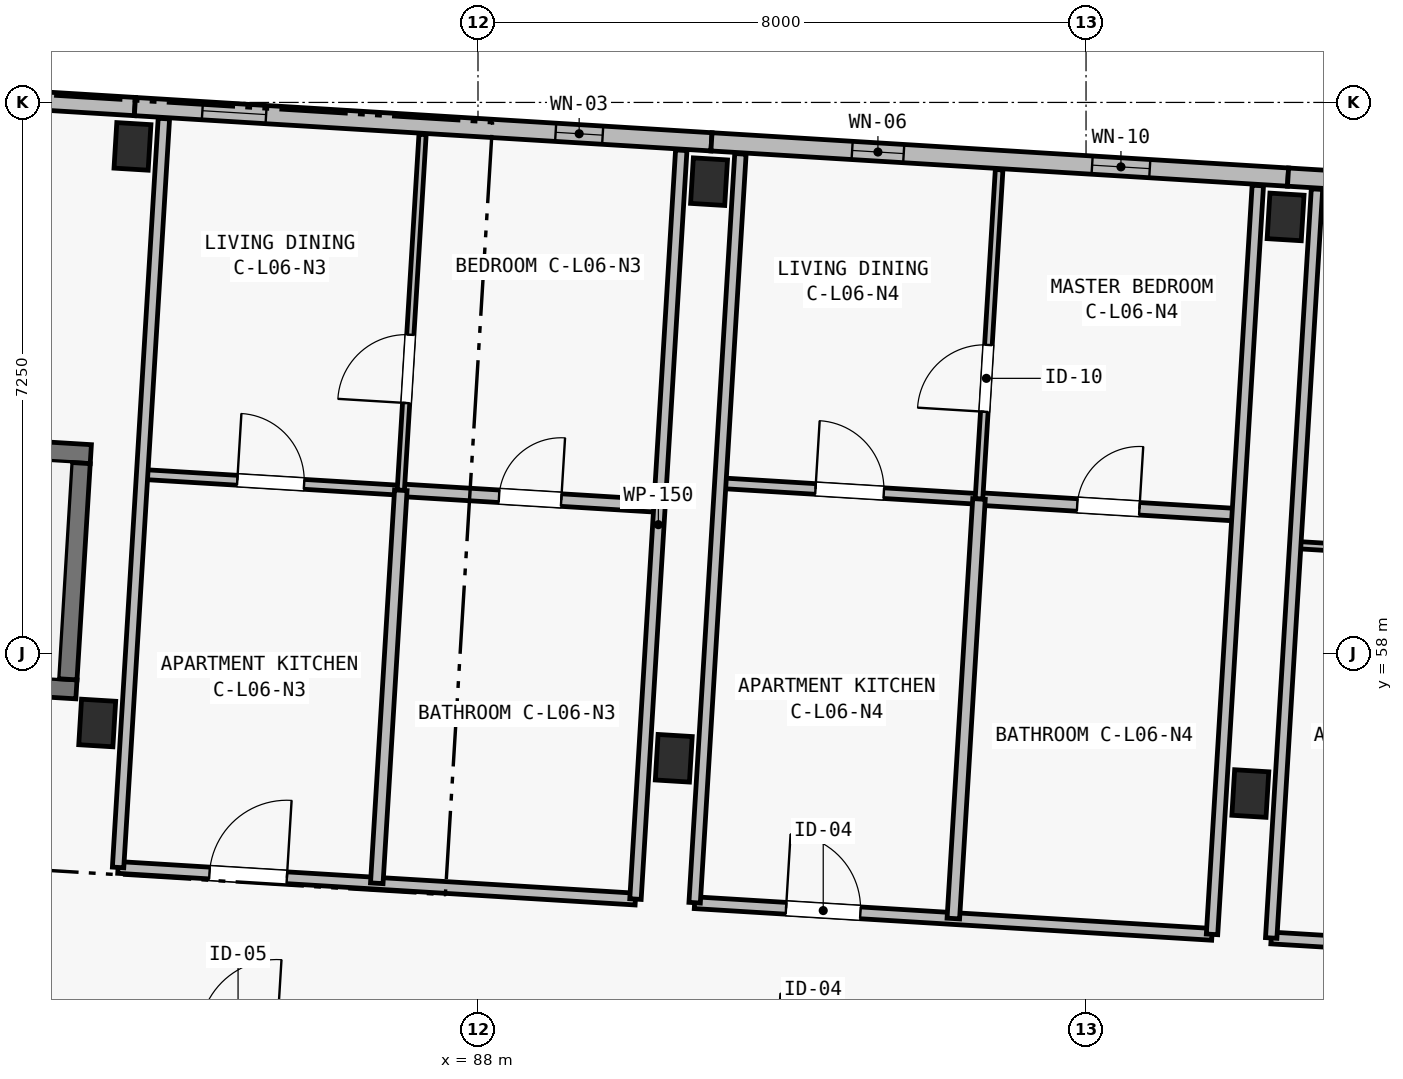
"""IFC4 building model, lengths in metres.
Left out: names, types, materials, properties, quantities, classifications, styles, units other than length and angle.
Written with IfcOpenShell. Run it as: python <this file> out.ifc"""

import sys

from ifc_helpers import new_model, si_unit, direction, frame, frame_2d, origin, origin_2d, place, context, subcontext, project, spatial, rectangle, extrude, element, fill, save


model = new_model("IFC4")
c1 = context("Model", 3, precision=1e-05, world=origin(), true_north=direction((0.0, 1.0)))
c2 = subcontext(c1, "Body", "Model", "MODEL_VIEW")
j1 = project(units=[si_unit("LENGTHUNIT", "METRE"), si_unit("PLANEANGLEUNIT", "RADIAN")], contexts=[c1])
p1 = place(None, origin())
s1 = spatial("IfcSite", under=j1, at=p1, CompositionType="ELEMENT")
p2 = place(p1, origin())
s2 = spatial("IfcBuilding", under=s1, at=p2, CompositionType="ELEMENT")
p3 = place(p2, frame((0.0, 0.0, 21.4)))
s3 = spatial("IfcBuildingStorey", under=s2, at=p3, CompositionType="ELEMENT", Elevation=21.4)
for number, where, z_axis, x_axis in (
    (1, (82.99, 57.086, 0.0), (0.0, 0.0, 1.0), (0.998, -0.061, 0.0)),
    (2, (83.454, 64.672, 0.0), (0.0, 0.0, 1.0), (0.998, -0.061, 0.0)),
    (3, (90.576, 56.622, 0.0), (0.0, 0.0, 1.0), (0.998, -0.061, 0.0)),
    (4, (91.04, 64.208, 0.0), (0.0, 0.0, 1.0), (0.998, -0.061, 0.0)),
    (5, (98.162, 56.158, 0.0), (0.0, 0.0, 1.0), (0.998, -0.061, 0.0)),
    (6, (98.626, 63.744, 0.0), (0.0, 0.0, 1.0), (0.998, -0.061, 0.0)),
):
    element("IfcColumn", number, at=place(p3, frame(where, z_axis=z_axis, x_axis=x_axis)), inside=s3, PredefinedType="COLUMN", context=c2, shape_type="SweptSolid", body=[
        extrude(rectangle(XDim=0.45, YDim=0.6, at=origin_2d()), origin(), (0.0, 0.0, 1.0), 3.25),
    ])
p4 = place(p3, frame((75.919, 61.05, 0.0), z_axis=(0.0, 0.0, 1.0), x_axis=(0.998135546153, -0.061036313012, 0.0)))
e7 = element("IfcWall", 7, at=p4, inside=s3, PredefinedType="SHEAR", context=c2, shape_type="SweptSolid", body=[
    extrude(rectangle(XDim=7.0, YDim=0.25, at=frame_2d((3.5, 0.0))), origin(), (0.0, 0.0, 1.0), 3.25),
])
p5 = place(p4, frame((0.45, 0.0, 0.0)))
e8 = element("IfcOpeningElement", 8, at=p5, cuts=e7, PredefinedType="OPENING", context=c2, shape_type="SweptSolid", body=[
    extrude(rectangle(XDim=0.9, YDim=2.1, at=frame_2d((0.45, 1.05))), frame((0.0, 0.14, 0.0), z_axis=(0.0, -1.0, 0.0), x_axis=(1.0, 0.0, 0.0)), (0.0, 0.0, 1.0), 0.28),
])
p6 = place(p3, frame((75.73, 57.956, 0.0), z_axis=(0.0, 0.0, 1.0), x_axis=(0.998135546153, -0.061036313012, 0.0)))
e9 = element("IfcWall", 9, at=p6, inside=s3, PredefinedType="SHEAR", context=c2, shape_type="SweptSolid", body=[
    extrude(rectangle(XDim=7.0, YDim=0.25, at=frame_2d((3.5, 0.0))), origin(), (0.0, 0.0, 1.0), 3.25),
])
p7 = place(p6, frame((0.45, 0.0, 0.0)))
e10 = element("IfcOpeningElement", 10, at=p7, cuts=e9, PredefinedType="OPENING", context=c2, shape_type="SweptSolid", body=[
    extrude(rectangle(XDim=1.05, YDim=2.15, at=frame_2d((0.525, 1.075))), frame((0.0, 0.14, 0.0), z_axis=(0.0, -1.0, 0.0), x_axis=(1.0, 0.0, 0.0)), (0.0, 0.0, 1.0), 0.28),
])
p8 = place(p3, frame((82.599, 57.661, 0.0), z_axis=(0.0, 0.0, 1.0), x_axis=(0.06107697143, 0.998133059046, 0.0)))
e11 = element("IfcWall", 11, at=p8, inside=s3, PredefinedType="SHEAR", context=c2, shape_type="SweptSolid", body=[
    extrude(rectangle(XDim=2.85, YDim=0.25, at=frame_2d((1.425, 0.0))), origin(), (0.0, 0.0, 1.0), 3.25),
])
p9 = place(p3, frame((81.115, 65.341, 0.0), z_axis=(0.0, 0.0, 1.0), x_axis=(0.998134103342, -0.061059902923, 0.0)))
e12 = element("IfcWall", 12, at=p9, inside=s3, PredefinedType="SOLIDWALL", context=c2, shape_type="SweptSolid", body=[
    extrude(rectangle(XDim=2.375, YDim=0.24, at=frame_2d((1.188, 0.0))), origin(), (0.0, 0.0, 1.0), 3.0),
])
p10 = place(p3, frame((83.486, 65.196, 0.0), z_axis=(0.0, 0.0, 1.0), x_axis=(0.998135669243, -0.061034300063, 0.0)))
e13 = element("IfcWall", 13, at=p10, inside=s3, PredefinedType="SOLIDWALL", context=c2, shape_type="SweptSolid", body=[
    extrude(rectangle(XDim=7.6, YDim=0.24, at=frame_2d((3.8, 0.0))), origin(), (0.0, 0.0, 1.0), 3.0),
])
p11 = place(p10, frame((0.89, 0.0, 0.5)))
e14 = element("IfcOpeningElement", 14, at=p11, cuts=e13, PredefinedType="OPENING", context=c2, shape_type="SweptSolid", body=[
    extrude(rectangle(XDim=0.84, YDim=2.28, at=frame_2d((0.42, 1.14))), frame((0.0, 0.135, 0.0), z_axis=(0.0, -1.0, 0.0), x_axis=(1.0, 0.0, 0.0)), (0.0, 0.0, 1.0), 0.27),
])
p12 = place(p10, frame((5.546, 0.0, 0.44)))
e15 = element("IfcOpeningElement", 15, at=p12, cuts=e13, PredefinedType="OPENING", context=c2, shape_type="SweptSolid", body=[
    extrude(rectangle(XDim=0.62, YDim=2.28, at=frame_2d((0.31, 1.14))), frame((0.0, 0.135, 0.0), z_axis=(0.0, -1.0, 0.0), x_axis=(1.0, 0.0, 0.0)), (0.0, 0.0, 1.0), 0.27),
])
p13 = place(p3, frame((91.072, 64.732, 0.0), z_axis=(0.0, 0.0, 1.0), x_axis=(0.998133591969, -0.061068261669, 0.0)))
e16 = element("IfcWall", 16, at=p13, inside=s3, PredefinedType="SOLIDWALL", context=c2, shape_type="SweptSolid", body=[
    extrude(rectangle(XDim=7.6, YDim=0.24, at=frame_2d((3.8, 0.0))), origin(), (0.0, 0.0, 1.0), 3.0),
])
p14 = place(p13, frame((1.854, 0.0, 0.44)))
e17 = element("IfcOpeningElement", 17, at=p14, cuts=e16, PredefinedType="OPENING", context=c2, shape_type="SweptSolid", body=[
    extrude(rectangle(XDim=0.68, YDim=2.24, at=frame_2d((0.34, 1.12))), frame((0.0, 0.135, 0.0), z_axis=(0.0, -1.0, 0.0), x_axis=(1.0, 0.0, 0.0)), (0.0, 0.0, 1.0), 0.27),
])
p15 = place(p13, frame((5.018, 0.0, 0.5)))
e18 = element("IfcOpeningElement", 18, at=p15, cuts=e16, PredefinedType="OPENING", context=c2, shape_type="SweptSolid", body=[
    extrude(rectangle(XDim=0.76, YDim=2.34, at=frame_2d((0.38, 1.17))), frame((0.0, 0.135, 0.0), z_axis=(0.0, -1.0, 0.0), x_axis=(1.0, 0.0, 0.0)), (0.0, 0.0, 1.0), 0.27),
])
p16 = place(p3, frame((98.658, 64.268, 0.0), z_axis=(0.0, 0.0, 1.0), x_axis=(0.998134248939, -0.061057522844, 0.0)))
e19 = element("IfcWall", 19, at=p16, inside=s3, PredefinedType="SOLIDWALL", context=c2, shape_type="SweptSolid", body=[
    extrude(rectangle(XDim=8.125, YDim=0.24, at=frame_2d((4.062, 0.0))), origin(), (0.0, 0.0, 1.0), 3.0),
])
p17 = place(p16, frame((1.334, 0.0, 0.5)))
e20 = element("IfcOpeningElement", 20, at=p17, cuts=e19, PredefinedType="OPENING", context=c2, shape_type="SweptSolid", body=[
    extrude(rectangle(XDim=0.82, YDim=2.18, at=frame_2d((0.41, 1.09))), frame((0.0, 0.135, 0.0), z_axis=(0.0, -1.0, 0.0), x_axis=(1.0, 0.0, 0.0)), (0.0, 0.0, 1.0), 0.27),
])
p18 = place(p16, frame((6.029, 0.0, 0.44)))
e21 = element("IfcOpeningElement", 21, at=p18, cuts=e19, PredefinedType="OPENING", context=c2, shape_type="SweptSolid", body=[
    extrude(rectangle(XDim=0.6, YDim=2.22, at=frame_2d((0.3, 1.11))), frame((0.0, 0.135, 0.0), z_axis=(0.0, -1.0, 0.0), x_axis=(1.0, 0.0, 0.0)), (0.0, 0.0, 1.0), 0.27),
])
p19 = place(p3, frame((78.415, 53.378, 0.0), z_axis=(0.0, 0.0, 1.0), x_axis=(0.998132736029, -0.061082250024, 0.0)))
e22 = element("IfcWall", 22, at=p19, inside=s3, PredefinedType="PARTITIONING", context=c2, shape_type="SweptSolid", body=[
    extrude(rectangle(XDim=4.105, YDim=0.155, at=frame_2d((2.052, 0.0))), origin(), (0.0, 0.0, 1.0), 2.97),
])
p20 = place(p19, frame((0.457, 0.0, 0.0)))
e23 = element("IfcOpeningElement", 23, at=p20, cuts=e22, PredefinedType="OPENING", context=c2, shape_type="SweptSolid", body=[
    extrude(rectangle(XDim=0.98, YDim=2.15, at=frame_2d((0.49, 1.075))), frame((0.0, 0.093, 0.0), z_axis=(0.0, -1.0, 0.0), x_axis=(1.0, 0.0, 0.0)), (0.0, 0.0, 1.0), 0.185),
])
p21 = place(p3, frame((83.265, 55.185, 0.0), z_axis=(0.0, 0.0, 1.0), x_axis=(0.998135531673, -0.061036549799, 0.0)))
e24 = element("IfcWall", 24, at=p21, inside=s3, PredefinedType="PARTITIONING", context=c2, shape_type="SweptSolid", body=[
    extrude(rectangle(XDim=6.82, YDim=0.155, at=frame_2d((3.41, 0.0))), origin(), (0.0, 0.0, 1.0), 2.97),
])
p22 = place(p21, frame((1.205, 0.0, 0.0)))
e25 = element("IfcOpeningElement", 25, at=p22, cuts=e24, PredefinedType="OPENING", context=c2, shape_type="SweptSolid", body=[
    extrude(rectangle(XDim=1.02, YDim=2.2, at=frame_2d((0.51, 1.1))), frame((0.0, 0.093, 0.0), z_axis=(0.0, -1.0, 0.0), x_axis=(1.0, 0.0, 0.0)), (0.0, 0.0, 1.0), 0.185),
])
p23 = place(p3, frame((83.581, 60.356, 0.0), z_axis=(0.0, 0.0, 1.0), x_axis=(0.998133350094, -0.061072214879, 0.0)))
e26 = element("IfcWall", 26, at=p23, inside=s3, PredefinedType="PARTITIONING", context=c2, shape_type="SweptSolid", body=[
    extrude(rectangle(XDim=3.41, YDim=0.13, at=frame_2d((1.705, 0.0))), origin(), (0.0, 0.0, 1.0), 2.97),
])
p24 = place(p23, frame((1.255, 0.0, 0.0)))
e27 = element("IfcOpeningElement", 27, at=p24, cuts=e26, PredefinedType="OPENING", context=c2, shape_type="SweptSolid", body=[
    extrude(rectangle(XDim=0.88, YDim=2.1, at=frame_2d((0.44, 1.05))), frame((0.0, 0.08, 0.0), z_axis=(0.0, -1.0, 0.0), x_axis=(1.0, 0.0, 0.0)), (0.0, 0.0, 1.0), 0.16),
])
p25 = place(p3, frame((86.984, 60.147, 0.0), z_axis=(0.0, 0.0, 1.0), x_axis=(0.99813797838, -0.060996525433, 0.0)))
e28 = element("IfcWall", 28, at=p25, inside=s3, PredefinedType="PLUMBINGWALL", context=c2, shape_type="SweptSolid", body=[
    extrude(rectangle(XDim=3.41, YDim=0.165, at=frame_2d((1.705, 0.0))), origin(), (0.0, 0.0, 1.0), 2.97),
])
p26 = place(p25, frame((1.295, 0.0, 0.0)))
e29 = element("IfcOpeningElement", 29, at=p26, cuts=e28, PredefinedType="OPENING", context=c2, shape_type="SweptSolid", body=[
    extrude(rectangle(XDim=0.82, YDim=2.08, at=frame_2d((0.41, 1.04))), frame((0.0, 0.097, 0.0), z_axis=(0.0, -1.0, 0.0), x_axis=(1.0, 0.0, 0.0)), (0.0, 0.0, 1.0), 0.195),
])
p27 = place(p3, frame((86.984, 60.147, 0.0), z_axis=(0.0, 0.0, 1.0), x_axis=(0.061059262019, 0.998134142549, 0.0)))
e30 = element("IfcWall", 30, at=p27, inside=s3, PredefinedType="PARTITIONING", context=c2, shape_type="SweptSolid", body=[
    extrude(rectangle(XDim=4.69, YDim=0.095, at=frame_2d((2.345, 0.0))), origin(), (0.0, 0.0, 1.0), 2.97),
])
p28 = place(p27, frame((1.15, 0.0, 0.0)))
e31 = element("IfcOpeningElement", 31, at=p28, cuts=e30, PredefinedType="OPENING", context=c2, shape_type="SweptSolid", body=[
    extrude(rectangle(XDim=0.9, YDim=2.1, at=frame_2d((0.45, 1.05))), frame((0.0, 0.062, 0.0), z_axis=(0.0, -1.0, 0.0), x_axis=(1.0, 0.0, 0.0)), (0.0, 0.0, 1.0), 0.125),
])
p29 = place(p3, frame((86.668, 54.977, 0.0), z_axis=(0.0, 0.0, 1.0), x_axis=(0.061037231879, 0.998135489963, 0.0)))
e32 = element("IfcWall", 32, at=p29, inside=s3, PredefinedType="PLUMBINGWALL", context=c2, shape_type="SweptSolid", body=[
    extrude(rectangle(XDim=5.18, YDim=0.165, at=frame_2d((2.59, 0.0))), origin(), (0.0, 0.0, 1.0), 2.97),
])
p30 = place(p3, frame((83.265, 55.185, 0.0), z_axis=(0.0, 0.0, 1.0), x_axis=(0.061046193261, 0.998134941923, 0.0)))
e33 = element("IfcWall", 33, at=p30, inside=s3, PredefinedType="PARTITIONING", context=c2, shape_type="SweptSolid", body=[
    extrude(rectangle(XDim=9.87, YDim=0.15, at=frame_2d((4.935, 0.0))), origin(), (0.0, 0.0, 1.0), 2.97),
])
p31 = place(p3, frame((90.072, 54.769, 0.0), z_axis=(0.0, 0.0, 1.0), x_axis=(0.061047700465, 0.998134849741, 0.0)))
e34 = element("IfcWall", 34, at=p31, inside=s3, PredefinedType="PARTITIONING", context=c2, shape_type="SweptSolid", body=[
    extrude(rectangle(XDim=9.87, YDim=0.15, at=frame_2d((4.935, 0.0))), origin(), (0.0, 0.0, 1.0), 2.97),
])
p32 = place(p3, frame((90.85, 54.721, 0.0), z_axis=(0.0, 0.0, 1.0), x_axis=(0.998135665032, -0.06103436893, 0.0)))
e35 = element("IfcWall", 35, at=p32, inside=s3, PredefinedType="PARTITIONING", context=c2, shape_type="SweptSolid", body=[
    extrude(rectangle(XDim=6.82, YDim=0.155, at=frame_2d((3.41, 0.0))), origin(), (0.0, 0.0, 1.0), 2.97),
])
p33 = place(p32, frame((1.205, 0.0, 0.0)))
e36 = element("IfcOpeningElement", 36, at=p33, cuts=e35, PredefinedType="OPENING", context=c2, shape_type="SweptSolid", body=[
    extrude(rectangle(XDim=0.98, YDim=2.15, at=frame_2d((0.49, 1.075))), frame((0.0, 0.093, 0.0), z_axis=(0.0, -1.0, 0.0), x_axis=(1.0, 0.0, 0.0)), (0.0, 0.0, 1.0), 0.185),
])
p34 = place(p3, frame((91.188, 60.241, 0.0), z_axis=(0.0, 0.0, 1.0), x_axis=(0.998133350094, -0.061072214879, 0.0)))
e37 = element("IfcWall", 37, at=p34, inside=s3, PredefinedType="PARTITIONING", context=c2, shape_type="SweptSolid", body=[
    extrude(rectangle(XDim=3.41, YDim=0.14, at=frame_2d((1.705, 0.0))), origin(), (0.0, 0.0, 1.0), 2.97),
])
p35 = place(p34, frame((1.255, 0.0, 0.0)))
e38 = element("IfcOpeningElement", 38, at=p35, cuts=e37, PredefinedType="OPENING", context=c2, shape_type="SweptSolid", body=[
    extrude(rectangle(XDim=0.9, YDim=2.1, at=frame_2d((0.45, 1.05))), frame((0.0, 0.085, 0.0), z_axis=(0.0, -1.0, 0.0), x_axis=(1.0, 0.0, 0.0)), (0.0, 0.0, 1.0), 0.17),
])
p36 = place(p3, frame((94.592, 60.033, 0.0), z_axis=(0.0, 0.0, 1.0), x_axis=(0.998133617109, -0.061067850767, 0.0)))
e39 = element("IfcWall", 39, at=p36, inside=s3, PredefinedType="PLUMBINGWALL", context=c2, shape_type="SweptSolid", body=[
    extrude(rectangle(XDim=3.41, YDim=0.165, at=frame_2d((1.705, 0.0))), origin(), (0.0, 0.0, 1.0), 2.97),
])
p37 = place(p36, frame((1.295, 0.0, 0.0)))
e40 = element("IfcOpeningElement", 40, at=p37, cuts=e39, PredefinedType="OPENING", context=c2, shape_type="SweptSolid", body=[
    extrude(rectangle(XDim=0.82, YDim=2.08, at=frame_2d((0.41, 1.04))), frame((0.0, 0.097, 0.0), z_axis=(0.0, -1.0, 0.0), x_axis=(1.0, 0.0, 0.0)), (0.0, 0.0, 1.0), 0.195),
])
p38 = place(p3, frame((94.592, 60.033, 0.0), z_axis=(0.0, 0.0, 1.0), x_axis=(0.061092906669, 0.998132083822, 0.0)))
e41 = element("IfcWall", 41, at=p38, inside=s3, PredefinedType="PARTITIONING", context=c2, shape_type="SweptSolid", body=[
    extrude(rectangle(XDim=4.34, YDim=0.1, at=frame_2d((2.17, 0.0))), origin(), (0.0, 0.0, 1.0), 2.97),
])
p39 = place(p38, frame((1.15, 0.0, 0.0)))
e42 = element("IfcOpeningElement", 42, at=p39, cuts=e41, PredefinedType="OPENING", context=c2, shape_type="SweptSolid", body=[
    extrude(rectangle(XDim=0.88, YDim=2.1, at=frame_2d((0.44, 1.05))), frame((0.0, 0.065, 0.0), z_axis=(0.0, -1.0, 0.0), x_axis=(1.0, 0.0, 0.0)), (0.0, 0.0, 1.0), 0.13),
])
p40 = place(p3, frame((94.254, 54.513, 0.0), z_axis=(0.0, 0.0, 1.0), x_axis=(0.061056206715, 0.998134329447, 0.0)))
e43 = element("IfcWall", 43, at=p40, inside=s3, PredefinedType="PLUMBINGWALL", context=c2, shape_type="SweptSolid", body=[
    extrude(rectangle(XDim=5.53, YDim=0.165, at=frame_2d((2.765, 0.0))), origin(), (0.0, 0.0, 1.0), 2.97),
])
for number, where, z_axis, x_axis in (
    (44, (90.85, 54.721, 0.0), (0.0, 0.0, 1.0), (0.061, 0.998, 0.0)),
    (45, (97.658, 54.305, 0.0), (0.0, 0.0, 1.0), (0.061, 0.998, 0.0)),
):
    element("IfcWall", number, at=place(p3, frame(where, z_axis=z_axis, x_axis=x_axis)), inside=s3, PredefinedType="PARTITIONING", context=c2, shape_type="SweptSolid", body=[
        extrude(rectangle(XDim=9.87, YDim=0.15, at=frame_2d((4.935, 0.0))), origin(), (0.0, 0.0, 1.0), 2.97),
    ])
p41 = place(p3, frame((98.436, 54.258, 0.0), z_axis=(0.0, 0.0, 1.0), x_axis=(0.998133350094, -0.061072214879, 0.0)))
e46 = element("IfcWall", 46, at=p41, inside=s3, PredefinedType="PARTITIONING", context=c2, shape_type="SweptSolid", body=[
    extrude(rectangle(XDim=6.82, YDim=0.155, at=frame_2d((3.41, 0.0))), origin(), (0.0, 0.0, 1.0), 2.97),
])
p42 = place(p41, frame((1.205, 0.0, 0.0)))
e47 = element("IfcOpeningElement", 47, at=p42, cuts=e46, PredefinedType="OPENING", context=c2, shape_type="SweptSolid", body=[
    extrude(rectangle(XDim=1.02, YDim=2.2, at=frame_2d((0.51, 1.1))), frame((0.0, 0.093, 0.0), z_axis=(0.0, -1.0, 0.0), x_axis=(1.0, 0.0, 0.0)), (0.0, 0.0, 1.0), 0.185),
])
p43 = place(p3, frame((98.752, 59.428, 0.0), z_axis=(0.0, 0.0, 1.0), x_axis=(0.998137711988, -0.061000884486, 0.0)))
e48 = element("IfcWall", 48, at=p43, inside=s3, PredefinedType="PARTITIONING", context=c2, shape_type="SweptSolid", body=[
    extrude(rectangle(XDim=3.41, YDim=0.095, at=frame_2d((1.705, 0.0))), origin(), (0.0, 0.0, 1.0), 2.97),
])
p44 = place(p43, frame((1.255, 0.0, 0.0)))
e49 = element("IfcOpeningElement", 49, at=p44, cuts=e48, PredefinedType="OPENING", context=c2, shape_type="SweptSolid", body=[
    extrude(rectangle(XDim=0.9, YDim=2.1, at=frame_2d((0.45, 1.05))), frame((0.0, 0.062, 0.0), z_axis=(0.0, -1.0, 0.0), x_axis=(1.0, 0.0, 0.0)), (0.0, 0.0, 1.0), 0.125),
])
p45 = place(p3, frame((98.436, 54.258, 0.0), z_axis=(0.0, 0.0, 1.0), x_axis=(0.061047700465, 0.998134849741, 0.0)))
e50 = element("IfcWall", 50, at=p45, inside=s3, PredefinedType="PARTITIONING", context=c2, shape_type="SweptSolid", body=[
    extrude(rectangle(XDim=9.87, YDim=0.15, at=frame_2d((4.935, 0.0))), origin(), (0.0, 0.0, 1.0), 2.97),
])
p46 = place(p11, origin())
e51 = element("IfcWindow", 51, at=p46, inside=s3, PartitioningType="SINGLE_PANEL", PredefinedType="WINDOW", context=c2, shape_type="SweptSolid", body=[
    extrude(rectangle(XDim=0.84, YDim=2.28, at=frame_2d((0.42, 1.14))), frame((0.0, 0.03, 0.0), z_axis=(0.0, -1.0, 0.0), x_axis=(1.0, 0.0, 0.0)), (0.0, 0.0, 1.0), 0.06),
])
fill(e14, e51)
p47 = place(p12, origin())
e52 = element("IfcWindow", 52, at=p47, inside=s3, PartitioningType="SINGLE_PANEL", PredefinedType="WINDOW", context=c2, shape_type="SweptSolid", body=[
    extrude(rectangle(XDim=0.62, YDim=2.28, at=frame_2d((0.31, 1.14))), frame((0.0, 0.03, 0.0), z_axis=(0.0, -1.0, 0.0), x_axis=(1.0, 0.0, 0.0)), (0.0, 0.0, 1.0), 0.06),
])
fill(e15, e52)
p48 = place(p14, origin())
e53 = element("IfcWindow", 53, at=p48, inside=s3, PartitioningType="SINGLE_PANEL", PredefinedType="WINDOW", context=c2, shape_type="SweptSolid", body=[
    extrude(rectangle(XDim=0.68, YDim=2.24, at=frame_2d((0.34, 1.12))), frame((0.0, 0.03, 0.0), z_axis=(0.0, -1.0, 0.0), x_axis=(1.0, 0.0, 0.0)), (0.0, 0.0, 1.0), 0.06),
])
fill(e17, e53)
p49 = place(p15, origin())
e54 = element("IfcWindow", 54, at=p49, inside=s3, PartitioningType="SINGLE_PANEL", PredefinedType="WINDOW", context=c2, shape_type="SweptSolid", body=[
    extrude(rectangle(XDim=0.76, YDim=2.34, at=frame_2d((0.38, 1.17))), frame((0.0, 0.03, 0.0), z_axis=(0.0, -1.0, 0.0), x_axis=(1.0, 0.0, 0.0)), (0.0, 0.0, 1.0), 0.06),
])
fill(e18, e54)
p50 = place(p22, origin())
e55 = element("IfcDoor", 55, at=p50, inside=s3, OperationType="SINGLE_SWING_RIGHT", PredefinedType="DOOR", context=c2, shape_type="SweptSolid", body=[
    extrude(rectangle(XDim=1.02, YDim=2.2, at=frame_2d((0.51, 1.1))), frame((0.0, 0.025, 0.0), z_axis=(0.0, -1.0, 0.0), x_axis=(1.0, 0.0, 0.0)), (0.0, 0.0, 1.0), 0.05),
])
fill(e25, e55)
p51 = place(p24, origin())
e56 = element("IfcDoor", 56, at=p51, inside=s3, OperationType="SINGLE_SWING_LEFT", PredefinedType="DOOR", context=c2, shape_type="SweptSolid", body=[
    extrude(rectangle(XDim=0.88, YDim=2.1, at=frame_2d((0.44, 1.05))), frame((0.0, 0.025, 0.0), z_axis=(0.0, -1.0, 0.0), x_axis=(1.0, 0.0, 0.0)), (0.0, 0.0, 1.0), 0.05),
])
fill(e27, e56)
p52 = place(p26, origin())
e57 = element("IfcDoor", 57, at=p52, inside=s3, OperationType="SINGLE_SWING_RIGHT", PredefinedType="DOOR", context=c2, shape_type="SweptSolid", body=[
    extrude(rectangle(XDim=0.82, YDim=2.08, at=frame_2d((0.41, 1.04))), frame((0.0, 0.025, 0.0), z_axis=(0.0, -1.0, 0.0), x_axis=(1.0, 0.0, 0.0)), (0.0, 0.0, 1.0), 0.05),
])
fill(e29, e57)
p53 = place(p28, origin())
e58 = element("IfcDoor", 58, at=p53, inside=s3, OperationType="SINGLE_SWING_LEFT", PredefinedType="DOOR", context=c2, shape_type="SweptSolid", body=[
    extrude(rectangle(XDim=0.9, YDim=2.1, at=frame_2d((0.45, 1.05))), frame((0.0, 0.025, 0.0), z_axis=(0.0, -1.0, 0.0), x_axis=(1.0, 0.0, 0.0)), (0.0, 0.0, 1.0), 0.05),
])
fill(e31, e58)
p54 = place(p33, origin())
e59 = element("IfcDoor", 59, at=p54, inside=s3, OperationType="SINGLE_SWING_LEFT", PredefinedType="DOOR", context=c2, shape_type="SweptSolid", body=[
    extrude(rectangle(XDim=0.98, YDim=2.15, at=frame_2d((0.49, 1.075))), frame((0.0, 0.025, 0.0), z_axis=(0.0, -1.0, 0.0), x_axis=(1.0, 0.0, 0.0)), (0.0, 0.0, 1.0), 0.05),
])
fill(e36, e59)
p55 = place(p35, origin())
e60 = element("IfcDoor", 60, at=p55, inside=s3, OperationType="SINGLE_SWING_LEFT", PredefinedType="DOOR", context=c2, shape_type="SweptSolid", body=[
    extrude(rectangle(XDim=0.9, YDim=2.1, at=frame_2d((0.45, 1.05))), frame((0.0, 0.025, 0.0), z_axis=(0.0, -1.0, 0.0), x_axis=(1.0, 0.0, 0.0)), (0.0, 0.0, 1.0), 0.05),
])
fill(e38, e60)
p56 = place(p37, origin())
e61 = element("IfcDoor", 61, at=p56, inside=s3, OperationType="SINGLE_SWING_RIGHT", PredefinedType="DOOR", context=c2, shape_type="SweptSolid", body=[
    extrude(rectangle(XDim=0.82, YDim=2.08, at=frame_2d((0.41, 1.04))), frame((0.0, 0.025, 0.0), z_axis=(0.0, -1.0, 0.0), x_axis=(1.0, 0.0, 0.0)), (0.0, 0.0, 1.0), 0.05),
])
fill(e40, e61)
p57 = place(p39, origin())
e62 = element("IfcDoor", 62, at=p57, inside=s3, OperationType="SINGLE_SWING_LEFT", PredefinedType="DOOR", context=c2, shape_type="SweptSolid", body=[
    extrude(rectangle(XDim=0.88, YDim=2.1, at=frame_2d((0.44, 1.05))), frame((0.0, 0.025, 0.0), z_axis=(0.0, -1.0, 0.0), x_axis=(1.0, 0.0, 0.0)), (0.0, 0.0, 1.0), 0.05),
])
fill(e42, e62)
save(model, sys.argv[1])
